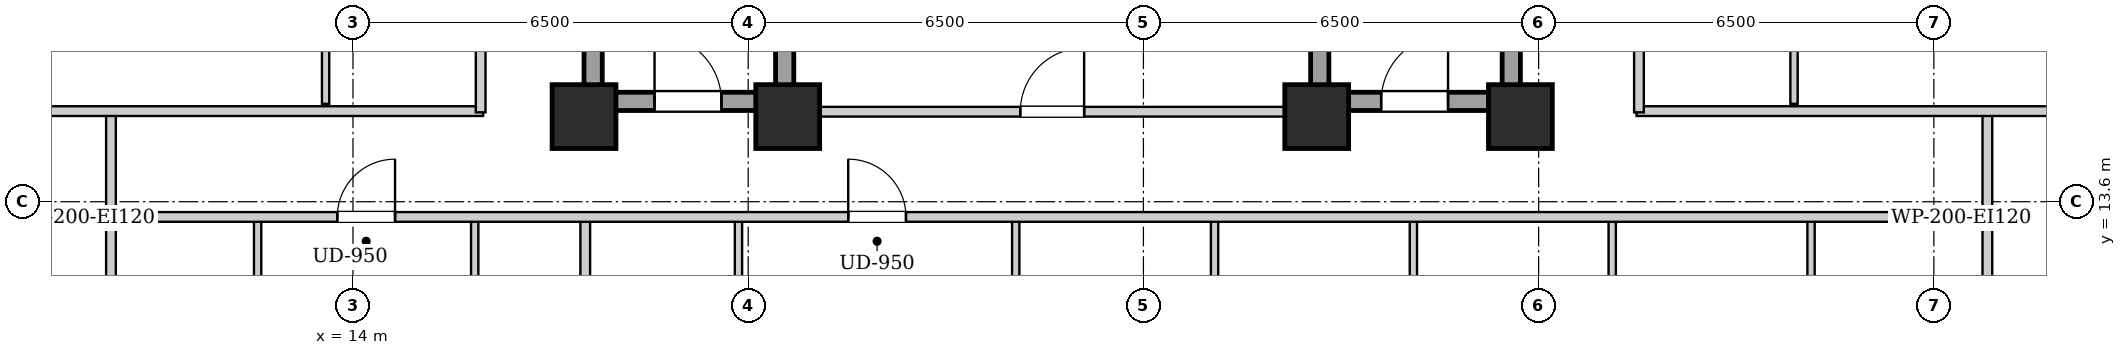
"""IFC4 building model, lengths in metres.
Left out: names, types, materials, properties, quantities, classifications, styles, units other than length and angle.
Written with IfcOpenShell. Run it as: python <this file> out.ifc"""

import sys

from ifc_helpers import new_model, si_unit, direction, frame, frame_2d, origin, origin_2d, place, context, subcontext, project, spatial, rectangle, extrude, element, fill, save


model = new_model("IFC4")
c1 = context("Model", 3, precision=1e-05, world=origin(), true_north=direction((0.0, 1.0)))
c2 = subcontext(c1, "Body", "Model", "MODEL_VIEW")
j1 = project(units=[si_unit("LENGTHUNIT", "METRE"), si_unit("PLANEANGLEUNIT", "RADIAN")], contexts=[c1])
p1 = place(None, origin())
s1 = spatial("IfcSite", under=j1, at=p1, CompositionType="ELEMENT")
p2 = place(p1, origin())
s2 = spatial("IfcBuilding", under=s1, at=p2, CompositionType="ELEMENT")
p3 = place(p2, frame((0.0, 0.0, 113.5)))
s3 = spatial("IfcBuildingStorey", under=s2, at=p3, CompositionType="ELEMENT", Elevation=113.5)
for number, where, z_axis, x_axis in (
    (1, (17.8, 15.0, 0.0), (0.0, 0.0, 1.0), (1.0, 0.0, 0.0)),
    (2, (21.15, 15.0, 0.0), (0.0, 0.0, 1.0), (1.0, 0.0, 0.0)),
    (3, (29.85, 15.0, 0.0), (0.0, 0.0, 1.0), (1.0, 0.0, 0.0)),
    (4, (33.2, 15.0, 0.0), (0.0, 0.0, 1.0), (1.0, 0.0, 0.0)),
):
    element("IfcColumn", number, at=place(p3, frame(where, z_axis=z_axis, x_axis=x_axis)), inside=s3, PredefinedType="COLUMN", context=c2, shape_type="SweptSolid", body=[
        extrude(rectangle(XDim=1.05, YDim=1.05, at=origin_2d()), origin(), (0.0, 0.0, 1.0), 3.2),
    ])
for number, where, z_axis, x_axis in (
    (5, (17.95, 15.1, 0.0), (0.0, 0.0, 1.0), (0.0, 1.0, 0.0)),
    (6, (21.1, 15.1, 0.0), (0.0, 0.0, 1.0), (0.0, 1.0, 0.0)),
):
    element("IfcWall", number, at=place(p3, frame(where, z_axis=z_axis, x_axis=x_axis)), inside=s3, PredefinedType="SHEAR", context=c2, shape_type="SweptSolid", body=[
        extrude(rectangle(XDim=9.0, YDim=0.3, at=frame_2d((4.5, 0.0))), origin(), (0.0, 0.0, 1.0), 2.94),
    ])
p4 = place(p3, frame((18.1, 15.25, 0.0), z_axis=(0.0, 0.0, 1.0), x_axis=(1.0, 0.0, 0.0)))
e7 = element("IfcWall", 7, at=p4, inside=s3, PredefinedType="SHEAR", context=c2, shape_type="SweptSolid", body=[
    extrude(rectangle(XDim=2.85, YDim=0.3, at=frame_2d((1.425, 0.0))), origin(), (0.0, 0.0, 1.0), 2.94),
])
p5 = place(p4, frame((0.86, 0.0, 0.0)))
e8 = element("IfcOpeningElement", 8, at=p5, cuts=e7, PredefinedType="OPENING", context=c2, shape_type="SweptSolid", body=[
    extrude(rectangle(XDim=1.1, YDim=2.05, at=frame_2d((0.55, 1.025))), frame((0.0, 0.16, 0.0), z_axis=(0.0, -1.0, 0.0), x_axis=(1.0, 0.0, 0.0)), (0.0, 0.0, 1.0), 0.32),
])
for number, where, z_axis, x_axis in (
    (9, (29.9, 15.1, 0.0), (0.0, 0.0, 1.0), (0.0, 1.0, 0.0)),
    (10, (33.05, 15.1, 0.0), (0.0, 0.0, 1.0), (0.0, 1.0, 0.0)),
):
    element("IfcWall", number, at=place(p3, frame(where, z_axis=z_axis, x_axis=x_axis)), inside=s3, PredefinedType="SHEAR", context=c2, shape_type="SweptSolid", body=[
        extrude(rectangle(XDim=9.0, YDim=0.3, at=frame_2d((4.5, 0.0))), origin(), (0.0, 0.0, 1.0), 2.94),
    ])
p6 = place(p3, frame((30.05, 15.25, 0.0), z_axis=(0.0, 0.0, 1.0), x_axis=(1.0, 0.0, 0.0)))
e11 = element("IfcWall", 11, at=p6, inside=s3, PredefinedType="SHEAR", context=c2, shape_type="SweptSolid", body=[
    extrude(rectangle(XDim=2.85, YDim=0.3, at=frame_2d((1.425, 0.0))), origin(), (0.0, 0.0, 1.0), 2.94),
])
p7 = place(p6, frame((0.86, 0.0, 0.0)))
e12 = element("IfcOpeningElement", 12, at=p7, cuts=e11, PredefinedType="OPENING", context=c2, shape_type="SweptSolid", body=[
    extrude(rectangle(XDim=1.1, YDim=2.05, at=frame_2d((0.55, 1.025))), frame((0.0, 0.16, 0.0), z_axis=(0.0, -1.0, 0.0), x_axis=(1.0, 0.0, 0.0)), (0.0, 0.0, 1.0), 0.32),
])
p8 = place(p3, frame((21.25, 15.08, 0.0), z_axis=(0.0, 0.0, 1.0), x_axis=(1.0, 0.0, 0.0)))
e13 = element("IfcWall", 13, at=p8, inside=s3, PredefinedType="PARTITIONING", context=c2, shape_type="SweptSolid", body=[
    extrude(rectangle(XDim=8.5, YDim=0.16, at=frame_2d((4.25, 0.0))), origin(), (0.0, 0.0, 1.0), 2.313),
])
p9 = place(p8, frame((3.725, 0.0, 0.0)))
e14 = element("IfcOpeningElement", 14, at=p9, cuts=e13, PredefinedType="OPENING", context=c2, shape_type="SweptSolid", body=[
    extrude(rectangle(XDim=1.05, YDim=2.05, at=frame_2d((0.525, 1.025))), frame((0.0, 0.09, 0.0), z_axis=(0.0, -1.0, 0.0), x_axis=(1.0, 0.0, 0.0)), (0.0, 0.0, 1.0), 0.18),
])
for number, where, z_axis, x_axis in (
    (15, (10.02, 13.35, 0.0), (0.0, 0.0, 1.0), (0.0, 1.0, 0.0)),
    (16, (40.88, 13.35, 0.0), (0.0, 0.0, 1.0), (0.0, 1.0, 0.0)),
):
    element("IfcWall", number, at=place(p3, frame(where, z_axis=z_axis, x_axis=x_axis)), inside=s3, PredefinedType="PARTITIONING", context=c2, shape_type="SweptSolid", body=[
        extrude(rectangle(XDim=1.74, YDim=0.16, at=frame_2d((0.87, 0.0))), origin(), (0.0, 0.0, 1.0), 2.94),
    ])
p10 = place(p3, frame((7.78, 15.09, 0.0), z_axis=(0.0, 0.0, 1.0), x_axis=(1.0, 0.0, 0.0)))
e17 = element("IfcWall", 17, at=p10, inside=s3, PredefinedType="PARTITIONING", context=c2, shape_type="SweptSolid", body=[
    extrude(rectangle(XDim=8.36, YDim=0.16, at=frame_2d((4.18, 0.0))), origin(), (0.0, 0.0, 1.0), 2.313),
])
p11 = place(p3, frame((35.11, 15.09, 0.0), z_axis=(0.0, 0.0, 1.0), x_axis=(1.0, 0.0, 0.0)))
e18 = element("IfcWall", 18, at=p11, inside=s3, PredefinedType="PARTITIONING", context=c2, shape_type="SweptSolid", body=[
    extrude(rectangle(XDim=8.01, YDim=0.16, at=frame_2d((4.005, 0.0))), origin(), (0.0, 0.0, 1.0), 2.313),
])
p12 = place(p3, frame((10.02, 10.4, 0.0), z_axis=(0.0, 0.0, 1.0), x_axis=(0.0, 1.0, 0.0)))
e19 = element("IfcWall", 19, at=p12, inside=s3, PredefinedType="PARTITIONING", context=c2, shape_type="SweptSolid", body=[
    extrude(rectangle(XDim=2.91, YDim=0.16, at=frame_2d((1.455, 0.0))), origin(), (0.0, 0.0, 1.0), 2.94),
])
p13 = place(p3, frame((12.432, 10.46, 0.0), z_axis=(0.0, 0.0, 1.0), x_axis=(0.0, 1.0, 0.0)))
e20 = element("IfcWall", 20, at=p13, inside=s3, PredefinedType="PARTITIONING", context=c2, shape_type="SweptSolid", body=[
    extrude(rectangle(XDim=2.85, YDim=0.12, at=frame_2d((1.425, 0.0))), origin(), (0.0, 0.0, 1.0), 2.94),
])
p14 = place(p13, frame((0.995, 0.0, 0.0)))
e21 = element("IfcOpeningElement", 21, at=p14, cuts=e20, PredefinedType="OPENING", context=c2, shape_type="SweptSolid", body=[
    extrude(rectangle(XDim=0.86, YDim=2.05, at=frame_2d((0.43, 1.025))), frame((0.0, 0.07, 0.0), z_axis=(0.0, -1.0, 0.0), x_axis=(1.0, 0.0, 0.0)), (0.0, 0.0, 1.0), 0.14),
])
p15 = place(p3, frame((16.002, 10.46, 0.0), z_axis=(0.0, 0.0, 1.0), x_axis=(0.0, 1.0, 0.0)))
e22 = element("IfcWall", 22, at=p15, inside=s3, PredefinedType="PARTITIONING", context=c2, shape_type="SweptSolid", body=[
    extrude(rectangle(XDim=2.85, YDim=0.12, at=frame_2d((1.425, 0.0))), origin(), (0.0, 0.0, 1.0), 2.94),
])
p16 = place(p15, frame((0.975, 0.0, 0.0)))
e23 = element("IfcOpeningElement", 23, at=p16, cuts=e22, PredefinedType="OPENING", context=c2, shape_type="SweptSolid", body=[
    extrude(rectangle(XDim=0.9, YDim=2.05, at=frame_2d((0.45, 1.025))), frame((0.0, 0.07, 0.0), z_axis=(0.0, -1.0, 0.0), x_axis=(1.0, 0.0, 0.0)), (0.0, 0.0, 1.0), 0.14),
])
p17 = place(p3, frame((40.88, 10.4, 0.0), z_axis=(0.0, 0.0, 1.0), x_axis=(0.0, 1.0, 0.0)))
e24 = element("IfcWall", 24, at=p17, inside=s3, PredefinedType="PARTITIONING", context=c2, shape_type="SweptSolid", body=[
    extrude(rectangle(XDim=2.91, YDim=0.16, at=frame_2d((1.455, 0.0))), origin(), (0.0, 0.0, 1.0), 2.94),
])
p18 = place(p3, frame((17.82, 2.26, 0.0), z_axis=(0.0, 0.0, 1.0), x_axis=(0.0, 1.0, 0.0)))
e25 = element("IfcWall", 25, at=p18, inside=s3, PredefinedType="PARTITIONING", context=c2, shape_type="SweptSolid", body=[
    extrude(rectangle(XDim=11.05, YDim=0.16, at=frame_2d((5.525, 0.0))), origin(), (0.0, 0.0, 1.0), 2.313),
])
p19 = place(p3, frame((20.34, 10.46, 0.0), z_axis=(0.0, 0.0, 1.0), x_axis=(0.0, 1.0, 0.0)))
e26 = element("IfcWall", 26, at=p19, inside=s3, PredefinedType="PARTITIONING", context=c2, shape_type="SweptSolid", body=[
    extrude(rectangle(XDim=2.85, YDim=0.12, at=frame_2d((1.425, 0.0))), origin(), (0.0, 0.0, 1.0), 2.94),
])
p20 = place(p19, frame((0.995, 0.0, 0.0)))
e27 = element("IfcOpeningElement", 27, at=p20, cuts=e26, PredefinedType="OPENING", context=c2, shape_type="SweptSolid", body=[
    extrude(rectangle(XDim=0.86, YDim=2.05, at=frame_2d((0.43, 1.025))), frame((0.0, 0.07, 0.0), z_axis=(0.0, -1.0, 0.0), x_axis=(1.0, 0.0, 0.0)), (0.0, 0.0, 1.0), 0.14),
])
p21 = place(p3, frame((24.9, 10.46, 0.0), z_axis=(0.0, 0.0, 1.0), x_axis=(0.0, 1.0, 0.0)))
e28 = element("IfcWall", 28, at=p21, inside=s3, PredefinedType="PARTITIONING", context=c2, shape_type="SweptSolid", body=[
    extrude(rectangle(XDim=2.85, YDim=0.12, at=frame_2d((1.425, 0.0))), origin(), (0.0, 0.0, 1.0), 2.94),
])
p22 = place(p21, frame((0.975, 0.0, 0.0)))
e29 = element("IfcOpeningElement", 29, at=p22, cuts=e28, PredefinedType="OPENING", context=c2, shape_type="SweptSolid", body=[
    extrude(rectangle(XDim=0.9, YDim=2.05, at=frame_2d((0.45, 1.025))), frame((0.0, 0.07, 0.0), z_axis=(0.0, -1.0, 0.0), x_axis=(1.0, 0.0, 0.0)), (0.0, 0.0, 1.0), 0.14),
])
p23 = place(p3, frame((28.17, 10.46, 0.0), z_axis=(0.0, 0.0, 1.0), x_axis=(0.0, 1.0, 0.0)))
e30 = element("IfcWall", 30, at=p23, inside=s3, PredefinedType="PARTITIONING", context=c2, shape_type="SweptSolid", body=[
    extrude(rectangle(XDim=2.85, YDim=0.12, at=frame_2d((1.425, 0.0))), origin(), (0.0, 0.0, 1.0), 2.94),
])
p24 = place(p23, frame((0.975, 0.0, 0.0)))
e31 = element("IfcOpeningElement", 31, at=p24, cuts=e30, PredefinedType="OPENING", context=c2, shape_type="SweptSolid", body=[
    extrude(rectangle(XDim=0.9, YDim=2.05, at=frame_2d((0.45, 1.025))), frame((0.0, 0.07, 0.0), z_axis=(0.0, -1.0, 0.0), x_axis=(1.0, 0.0, 0.0)), (0.0, 0.0, 1.0), 0.14),
])
p25 = place(p3, frame((31.44, 10.46, 0.0), z_axis=(0.0, 0.0, 1.0), x_axis=(0.0, 1.0, 0.0)))
e32 = element("IfcWall", 32, at=p25, inside=s3, PredefinedType="PARTITIONING", context=c2, shape_type="SweptSolid", body=[
    extrude(rectangle(XDim=2.85, YDim=0.12, at=frame_2d((1.425, 0.0))), origin(), (0.0, 0.0, 1.0), 2.94),
])
p26 = place(p25, frame((0.975, 0.0, 0.0)))
e33 = element("IfcOpeningElement", 33, at=p26, cuts=e32, PredefinedType="OPENING", context=c2, shape_type="SweptSolid", body=[
    extrude(rectangle(XDim=0.9, YDim=2.05, at=frame_2d((0.45, 1.025))), frame((0.0, 0.07, 0.0), z_axis=(0.0, -1.0, 0.0), x_axis=(1.0, 0.0, 0.0)), (0.0, 0.0, 1.0), 0.14),
])
p27 = place(p3, frame((34.71, 10.46, 0.0), z_axis=(0.0, 0.0, 1.0), x_axis=(0.0, 1.0, 0.0)))
e34 = element("IfcWall", 34, at=p27, inside=s3, PredefinedType="PARTITIONING", context=c2, shape_type="SweptSolid", body=[
    extrude(rectangle(XDim=2.85, YDim=0.12, at=frame_2d((1.425, 0.0))), origin(), (0.0, 0.0, 1.0), 2.94),
])
p28 = place(p27, frame((0.975, 0.0, 0.0)))
e35 = element("IfcOpeningElement", 35, at=p28, cuts=e34, PredefinedType="OPENING", context=c2, shape_type="SweptSolid", body=[
    extrude(rectangle(XDim=0.9, YDim=2.05, at=frame_2d((0.45, 1.025))), frame((0.0, 0.07, 0.0), z_axis=(0.0, -1.0, 0.0), x_axis=(1.0, 0.0, 0.0)), (0.0, 0.0, 1.0), 0.14),
])
p29 = place(p3, frame((37.98, 10.46, 0.0), z_axis=(0.0, 0.0, 1.0), x_axis=(0.0, 1.0, 0.0)))
e36 = element("IfcWall", 36, at=p29, inside=s3, PredefinedType="PARTITIONING", context=c2, shape_type="SweptSolid", body=[
    extrude(rectangle(XDim=2.85, YDim=0.12, at=frame_2d((1.425, 0.0))), origin(), (0.0, 0.0, 1.0), 2.94),
])
p30 = place(p29, frame((0.975, 0.0, 0.0)))
e37 = element("IfcOpeningElement", 37, at=p30, cuts=e36, PredefinedType="OPENING", context=c2, shape_type="SweptSolid", body=[
    extrude(rectangle(XDim=0.9, YDim=2.05, at=frame_2d((0.45, 1.025))), frame((0.0, 0.07, 0.0), z_axis=(0.0, -1.0, 0.0), x_axis=(1.0, 0.0, 0.0)), (0.0, 0.0, 1.0), 0.14),
])
for number, where, z_axis, x_axis in (
    (38, (13.55, 15.21, 0.0), (0.0, 0.0, 1.0), (0.0, 1.0, 0.0)),
    (39, (37.7, 15.21, 0.0), (0.0, 0.0, 1.0), (0.0, 1.0, 0.0)),
):
    element("IfcWall", number, at=place(p3, frame(where, z_axis=z_axis, x_axis=x_axis)), inside=s3, PredefinedType="PARTITIONING", context=c2, shape_type="SweptSolid", body=[
        extrude(rectangle(XDim=2.159, YDim=0.12, at=frame_2d((1.08, 0.0))), origin(), (0.0, 0.0, 1.0), 2.94),
    ])
p31 = place(p3, frame((10.05, 13.35, 0.0), z_axis=(0.0, 0.0, 1.0), x_axis=(1.0, 0.0, 0.0)))
e40 = element("IfcWall", 40, at=p31, inside=s3, PredefinedType="PARTITIONING", context=c2, shape_type="SweptSolid", body=[
    extrude(rectangle(XDim=30.8, YDim=0.16, at=frame_2d((15.4, 0.0))), origin(), (0.0, 0.0, 1.0), 2.94),
])
p32 = place(p31, frame((3.692, 0.0, 0.0)))
e41 = element("IfcOpeningElement", 41, at=p32, cuts=e40, PredefinedType="OPENING", context=c2, shape_type="SweptSolid", body=[
    extrude(rectangle(XDim=0.95, YDim=2.1, at=frame_2d((0.475, 1.05))), frame((0.0, 0.09, 0.0), z_axis=(0.0, -1.0, 0.0), x_axis=(1.0, 0.0, 0.0)), (0.0, 0.0, 1.0), 0.18),
])
p33 = place(p31, frame((12.095, 0.0, 0.0)))
e42 = element("IfcOpeningElement", 42, at=p33, cuts=e40, PredefinedType="OPENING", context=c2, shape_type="SweptSolid", body=[
    extrude(rectangle(XDim=0.95, YDim=2.1, at=frame_2d((0.475, 1.05))), frame((0.0, 0.09, 0.0), z_axis=(0.0, -1.0, 0.0), x_axis=(1.0, 0.0, 0.0)), (0.0, 0.0, 1.0), 0.18),
])
p34 = place(p3, frame((16.1, 15.07, 0.0), z_axis=(0.0, 0.0, 1.0), x_axis=(0.0, 1.0, 0.0)))
e43 = element("IfcWall", 43, at=p34, inside=s3, PredefinedType="PARTITIONING", context=c2, shape_type="SweptSolid", body=[
    extrude(rectangle(XDim=13.93, YDim=0.16, at=frame_2d((6.965, 0.0))), origin(), (0.0, 0.0, 1.0), 2.94),
])
p35 = place(p34, frame((4.661, 0.0, 0.0)))
e44 = element("IfcOpeningElement", 44, at=p35, cuts=e43, PredefinedType="OPENING", context=c2, shape_type="SweptSolid", body=[
    extrude(rectangle(XDim=0.95, YDim=2.1, at=frame_2d((0.475, 1.05))), frame((0.0, 0.09, 0.0), z_axis=(0.0, -1.0, 0.0), x_axis=(1.0, 0.0, 0.0)), (0.0, 0.0, 1.0), 0.18),
])
p36 = place(p34, frame((11.411, 0.0, 0.0)))
e45 = element("IfcOpeningElement", 45, at=p36, cuts=e43, PredefinedType="OPENING", context=c2, shape_type="SweptSolid", body=[
    extrude(rectangle(XDim=0.95, YDim=2.1, at=frame_2d((0.475, 1.05))), frame((0.0, 0.09, 0.0), z_axis=(0.0, -1.0, 0.0), x_axis=(1.0, 0.0, 0.0)), (0.0, 0.0, 1.0), 0.18),
])
p37 = place(p3, frame((35.15, 15.07, 0.0), z_axis=(0.0, 0.0, 1.0), x_axis=(0.0, 1.0, 0.0)))
e46 = element("IfcWall", 46, at=p37, inside=s3, PredefinedType="PARTITIONING", context=c2, shape_type="SweptSolid", body=[
    extrude(rectangle(XDim=13.93, YDim=0.16, at=frame_2d((6.965, 0.0))), origin(), (0.0, 0.0, 1.0), 2.94),
])
p38 = place(p37, frame((4.661, 0.0, 0.0)))
e47 = element("IfcOpeningElement", 47, at=p38, cuts=e46, PredefinedType="OPENING", context=c2, shape_type="SweptSolid", body=[
    extrude(rectangle(XDim=0.95, YDim=2.1, at=frame_2d((0.475, 1.05))), frame((0.0, 0.09, 0.0), z_axis=(0.0, -1.0, 0.0), x_axis=(1.0, 0.0, 0.0)), (0.0, 0.0, 1.0), 0.18),
])
p39 = place(p37, frame((11.411, 0.0, 0.0)))
e48 = element("IfcOpeningElement", 48, at=p39, cuts=e46, PredefinedType="OPENING", context=c2, shape_type="SweptSolid", body=[
    extrude(rectangle(XDim=0.95, YDim=2.1, at=frame_2d((0.475, 1.05))), frame((0.0, 0.09, 0.0), z_axis=(0.0, -1.0, 0.0), x_axis=(1.0, 0.0, 0.0)), (0.0, 0.0, 1.0), 0.18),
])
p40 = place(p5, origin())
e49 = element("IfcDoor", 49, at=p40, inside=s3, OperationType="SINGLE_SWING_LEFT", PredefinedType="DOOR", context=c2, shape_type="SweptSolid", body=[
    extrude(rectangle(XDim=1.1, YDim=2.05, at=frame_2d((0.55, 1.025))), frame((0.0, 0.025, 0.0), z_axis=(0.0, -1.0, 0.0), x_axis=(1.0, 0.0, 0.0)), (0.0, 0.0, 1.0), 0.05),
])
fill(e8, e49)
p41 = place(p7, origin())
e50 = element("IfcDoor", 50, at=p41, inside=s3, OperationType="SINGLE_SWING_RIGHT", PredefinedType="DOOR", context=c2, shape_type="SweptSolid", body=[
    extrude(rectangle(XDim=1.1, YDim=2.05, at=frame_2d((0.55, 1.025))), frame((0.0, 0.025, 0.0), z_axis=(0.0, -1.0, 0.0), x_axis=(1.0, 0.0, 0.0)), (0.0, 0.0, 1.0), 0.05),
])
fill(e12, e50)
p42 = place(p9, origin())
e51 = element("IfcDoor", 51, at=p42, inside=s3, OperationType="SINGLE_SWING_RIGHT", PredefinedType="DOOR", context=c2, shape_type="SweptSolid", body=[
    extrude(rectangle(XDim=1.05, YDim=2.05, at=frame_2d((0.525, 1.025))), frame((0.0, 0.025, 0.0), z_axis=(0.0, -1.0, 0.0), x_axis=(1.0, 0.0, 0.0)), (0.0, 0.0, 1.0), 0.05),
])
fill(e14, e51)
p43 = place(p32, origin())
e52 = element("IfcDoor", 52, at=p43, inside=s3, OperationType="SINGLE_SWING_RIGHT", PredefinedType="DOOR", context=c2, shape_type="SweptSolid", body=[
    extrude(rectangle(XDim=0.95, YDim=2.1, at=frame_2d((0.475, 1.05))), frame((0.0, 0.025, 0.0), z_axis=(0.0, -1.0, 0.0), x_axis=(1.0, 0.0, 0.0)), (0.0, 0.0, 1.0), 0.05),
])
fill(e41, e52)
p44 = place(p33, origin())
e53 = element("IfcDoor", 53, at=p44, inside=s3, OperationType="SINGLE_SWING_LEFT", PredefinedType="DOOR", context=c2, shape_type="SweptSolid", body=[
    extrude(rectangle(XDim=0.95, YDim=2.1, at=frame_2d((0.475, 1.05))), frame((0.0, 0.025, 0.0), z_axis=(0.0, -1.0, 0.0), x_axis=(1.0, 0.0, 0.0)), (0.0, 0.0, 1.0), 0.05),
])
fill(e42, e53)
save(model, sys.argv[1])
